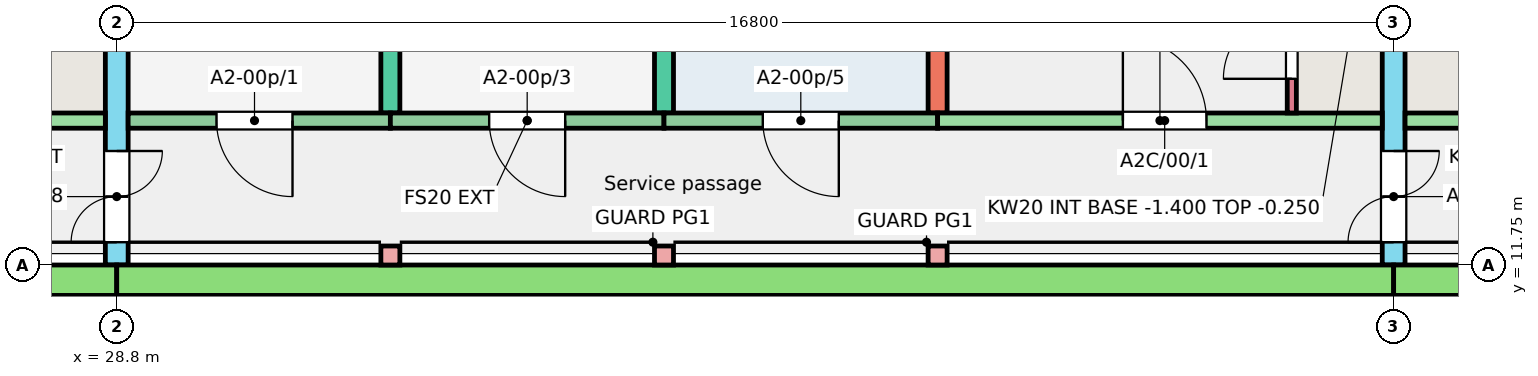
"""IFC4 building model, lengths in metres.
Left out: names, types, materials, properties, quantities, classifications, styles, units other than length and angle.
Written with IfcOpenShell. Run it as: python <this file> out.ifc"""

import sys

from ifc_helpers import new_model, si_unit, direction, frame, frame_2d, origin, origin_2d, place, context, subcontext, project, spatial, rectangle, extrude, element, fill, save


model = new_model("IFC4")
c1 = context("Model", 3, precision=1e-05, world=origin(), true_north=direction((0.0, 1.0)))
c2 = subcontext(c1, "Body", "Model", "MODEL_VIEW")
j1 = project(units=[si_unit("LENGTHUNIT", "METRE"), si_unit("PLANEANGLEUNIT", "RADIAN")], contexts=[c1])
p1 = place(None, origin())
s1 = spatial("IfcSite", under=j1, at=p1, CompositionType="ELEMENT")
p2 = place(p1, origin())
s2 = spatial("IfcBuilding", under=s1, at=p2, CompositionType="ELEMENT")
p3 = place(p2, origin())
s3 = spatial("IfcBuildingStorey", under=s2, at=p3, CompositionType="ELEMENT", Elevation=0.0)
p4 = place(p3, frame((28.8, 11.75, -0.25), z_axis=(0.0, 0.0, 1.0), x_axis=(0.0, 1.0, 0.0)))
e1 = element("IfcWall", 1, at=p4, inside=s3, PredefinedType="SHEAR", context=c2, shape_type="SweptSolid", body=[
    extrude(rectangle(XDim=11.0, YDim=0.3, at=frame_2d((5.5, 0.0))), origin(), (0.0, 0.0, 1.0), 3.25),
])
p5 = place(p4, frame((0.3, 0.0, 0.25)))
e2 = element("IfcOpeningElement", 2, at=p5, cuts=e1, PredefinedType="OPENING", context=c2, shape_type="SweptSolid", body=[
    extrude(rectangle(XDim=1.2, YDim=2.1, at=frame_2d((0.6, 1.05))), frame((0.0, 0.16, 0.0), z_axis=(0.0, -1.0, 0.0), x_axis=(1.0, 0.0, 0.0)), (0.0, 0.0, 1.0), 0.32),
])
for number, where, z_axis, x_axis in (
    (3, (32.4, 13.75, -0.25), (0.0, 0.0, 1.0), (0.0, 1.0, 0.0)),
    (4, (36.0, 13.75, -0.25), (0.0, 0.0, 1.0), (0.0, 1.0, 0.0)),
    (5, (39.6, 13.75, -0.25), (0.0, 0.0, 1.0), (0.0, 1.0, 0.0)),
):
    element("IfcWall", number, at=place(p3, frame(where, z_axis=z_axis, x_axis=x_axis)), inside=s3, PredefinedType="SHEAR", context=c2, shape_type="SweptSolid", body=[
        extrude(rectangle(XDim=9.0, YDim=0.25, at=frame_2d((4.5, 0.0))), origin(), (0.0, 0.0, 1.0), 3.25),
    ])
p6 = place(p3, frame((45.6, 11.75, -0.25), z_axis=(0.0, 0.0, 1.0), x_axis=(0.0, 1.0, 0.0)))
e6 = element("IfcWall", 6, at=p6, inside=s3, PredefinedType="SHEAR", context=c2, shape_type="SweptSolid", body=[
    extrude(rectangle(XDim=11.0, YDim=0.3, at=frame_2d((5.5, 0.0))), origin(), (0.0, 0.0, 1.0), 3.25),
])
p7 = place(p6, frame((0.3, 0.0, 0.25)))
e7 = element("IfcOpeningElement", 7, at=p7, cuts=e6, PredefinedType="OPENING", context=c2, shape_type="SweptSolid", body=[
    extrude(rectangle(XDim=1.2, YDim=2.1, at=frame_2d((0.6, 1.05))), frame((0.0, 0.16, 0.0), z_axis=(0.0, -1.0, 0.0), x_axis=(1.0, 0.0, 0.0)), (0.0, 0.0, 1.0), 0.32),
])
p8 = place(p3, frame((22.8, 13.65, -0.25), z_axis=(0.0, 0.0, 1.0), x_axis=(1.0, 0.0, 0.0)))
e8 = element("IfcWall", 8, at=p8, inside=s3, PredefinedType="SHEAR", context=c2, shape_type="SweptSolid", body=[
    extrude(rectangle(XDim=5.85, YDim=0.2, at=frame_2d((2.925, 0.0))), origin(), (0.0, 0.0, 1.0), 3.25),
])
p9 = place(p8, frame((2.438, 0.0, 0.25)))
e9 = element("IfcOpeningElement", 9, at=p9, cuts=e8, PredefinedType="OPENING", context=c2, shape_type="SweptSolid", body=[
    extrude(rectangle(XDim=1.1, YDim=2.1, at=frame_2d((0.55, 1.05))), frame((0.0, 0.11, 0.0), z_axis=(0.0, -1.0, 0.0), x_axis=(1.0, 0.0, 0.0)), (0.0, 0.0, 1.0), 0.22),
])
p10 = place(p3, frame((28.95, 13.65, -0.25), z_axis=(0.0, 0.0, 1.0), x_axis=(1.0, 0.0, 0.0)))
e10 = element("IfcWall", 10, at=p10, inside=s3, PredefinedType="SOLIDWALL", context=c2, shape_type="SweptSolid", body=[
    extrude(rectangle(XDim=3.45, YDim=0.2, at=frame_2d((1.725, 0.0))), origin(), (0.0, 0.0, 1.0), 3.25),
])
p11 = place(p10, frame((1.163, 0.0, 0.25)))
e11 = element("IfcOpeningElement", 11, at=p11, cuts=e10, PredefinedType="OPENING", context=c2, shape_type="SweptSolid", body=[
    extrude(rectangle(XDim=1.0, YDim=2.1, at=frame_2d((0.5, 1.05))), frame((0.0, 0.11, 0.0), z_axis=(0.0, -1.0, 0.0), x_axis=(1.0, 0.0, 0.0)), (0.0, 0.0, 1.0), 0.22),
])
p12 = place(p3, frame((32.4, 13.65, -0.25), z_axis=(0.0, 0.0, 1.0), x_axis=(1.0, 0.0, 0.0)))
e12 = element("IfcWall", 12, at=p12, inside=s3, PredefinedType="SOLIDWALL", context=c2, shape_type="SweptSolid", body=[
    extrude(rectangle(XDim=3.6, YDim=0.2, at=frame_2d((1.8, 0.0))), origin(), (0.0, 0.0, 1.0), 3.25),
])
p13 = place(p12, frame((1.3, 0.0, 0.25)))
e13 = element("IfcOpeningElement", 13, at=p13, cuts=e12, PredefinedType="OPENING", context=c2, shape_type="SweptSolid", body=[
    extrude(rectangle(XDim=1.0, YDim=2.1, at=frame_2d((0.5, 1.05))), frame((0.0, 0.11, 0.0), z_axis=(0.0, -1.0, 0.0), x_axis=(1.0, 0.0, 0.0)), (0.0, 0.0, 1.0), 0.22),
])
p14 = place(p3, frame((36.0, 13.65, -0.25), z_axis=(0.0, 0.0, 1.0), x_axis=(1.0, 0.0, 0.0)))
e14 = element("IfcWall", 14, at=p14, inside=s3, PredefinedType="SOLIDWALL", context=c2, shape_type="SweptSolid", body=[
    extrude(rectangle(XDim=3.6, YDim=0.2, at=frame_2d((1.8, 0.0))), origin(), (0.0, 0.0, 1.0), 3.25),
])
p15 = place(p14, frame((1.3, 0.0, 0.25)))
e15 = element("IfcOpeningElement", 15, at=p15, cuts=e14, PredefinedType="OPENING", context=c2, shape_type="SweptSolid", body=[
    extrude(rectangle(XDim=1.0, YDim=2.1, at=frame_2d((0.5, 1.05))), frame((0.0, 0.11, 0.0), z_axis=(0.0, -1.0, 0.0), x_axis=(1.0, 0.0, 0.0)), (0.0, 0.0, 1.0), 0.22),
])
p16 = place(p3, frame((39.6, 13.65, -0.25), z_axis=(0.0, 0.0, 1.0), x_axis=(1.0, 0.0, 0.0)))
e16 = element("IfcWall", 16, at=p16, inside=s3, PredefinedType="SHEAR", context=c2, shape_type="SweptSolid", body=[
    extrude(rectangle(XDim=5.85, YDim=0.2, at=frame_2d((2.925, 0.0))), origin(), (0.0, 0.0, 1.0), 3.25),
])
p17 = place(p16, frame((2.438, 0.0, 0.25)))
e17 = element("IfcOpeningElement", 17, at=p17, cuts=e16, PredefinedType="OPENING", context=c2, shape_type="SweptSolid", body=[
    extrude(rectangle(XDim=1.1, YDim=2.1, at=frame_2d((0.55, 1.05))), frame((0.0, 0.11, 0.0), z_axis=(0.0, -1.0, 0.0), x_axis=(1.0, 0.0, 0.0)), (0.0, 0.0, 1.0), 0.22),
])
p18 = place(p3, frame((44.26, 13.75, -0.25), z_axis=(0.0, 0.0, 1.0), x_axis=(0.0, 1.0, 0.0)))
e18 = element("IfcWall", 18, at=p18, inside=s3, PredefinedType="SHEAR", context=c2, shape_type="SweptSolid", body=[
    extrude(rectangle(XDim=1.72, YDim=0.12, at=frame_2d((0.86, 0.0))), origin(), (0.0, 0.0, 1.0), 3.25),
])
p19 = place(p18, frame((0.45, 0.0, 0.25)))
e19 = element("IfcOpeningElement", 19, at=p19, cuts=e18, PredefinedType="OPENING", context=c2, shape_type="SweptSolid", body=[
    extrude(rectangle(XDim=0.9, YDim=2.1, at=frame_2d((0.45, 1.05))), frame((0.0, 0.07, 0.0), z_axis=(0.0, -1.0, 0.0), x_axis=(1.0, 0.0, 0.0)), (0.0, 0.0, 1.0), 0.14),
])
p20 = place(p3, frame((45.75, 13.65, -0.25), z_axis=(0.0, 0.0, 1.0), x_axis=(1.0, 0.0, 0.0)))
e20 = element("IfcWall", 20, at=p20, inside=s3, PredefinedType="SHEAR", context=c2, shape_type="SweptSolid", body=[
    extrude(rectangle(XDim=5.85, YDim=0.2, at=frame_2d((2.925, 0.0))), origin(), (0.0, 0.0, 1.0), 3.25),
])
p21 = place(p20, frame((2.312, 0.0, 0.25)))
e21 = element("IfcOpeningElement", 21, at=p21, cuts=e20, PredefinedType="OPENING", context=c2, shape_type="SweptSolid", body=[
    extrude(rectangle(XDim=1.1, YDim=2.1, at=frame_2d((0.55, 1.05))), frame((0.0, 0.11, 0.0), z_axis=(0.0, -1.0, 0.0), x_axis=(1.0, 0.0, 0.0)), (0.0, 0.0, 1.0), 0.22),
])
for number, where, z_axis, x_axis in (
    (22, (32.4, 11.875, -0.25), (0.0, 0.0, 1.0), (1.0, 0.0, 0.0)),
    (23, (36.0, 11.875, -0.25), (0.0, 0.0, 1.0), (1.0, 0.0, 0.0)),
    (24, (39.6, 11.875, -0.25), (0.0, 0.0, 1.0), (1.0, 0.0, 0.0)),
):
    element("IfcColumn", number, at=place(p3, frame(where, z_axis=z_axis, x_axis=x_axis)), inside=s3, PredefinedType="COLUMN", context=c2, shape_type="SweptSolid", body=[
        extrude(rectangle(XDim=0.25, YDim=0.25, at=origin_2d()), origin(), (0.0, 0.0, 1.0), 3.25),
    ])
for number, where, z_axis, x_axis in (
    (25, (12.0, 11.55, -0.25), (0.0, 0.0, 1.0), (1.0, 0.0, 0.0)),
    (26, (28.8, 11.55, -0.25), (0.0, 0.0, 1.0), (1.0, 0.0, 0.0)),
):
    element("IfcWall", number, at=place(p3, frame(where, z_axis=z_axis, x_axis=x_axis)), inside=s3, PredefinedType="SOLIDWALL", context=c2, shape_type="SweptSolid", body=[
        extrude(rectangle(XDim=16.8, YDim=0.4, at=frame_2d((8.4, 0.0))), origin(), (0.0, 0.0, 1.0), 3.25),
    ])
p22 = place(p3, frame((45.6, 11.55, -0.25), z_axis=(0.0, 0.0, 1.0), x_axis=(1.0, 0.0, 0.0)))
e27 = element("IfcWall", 27, at=p22, inside=s3, PredefinedType="SOLIDWALL", context=c2, shape_type="SweptSolid", body=[
    extrude(rectangle(XDim=16.8, YDim=0.4, at=frame_2d((8.4, 0.0))), origin(), (0.0, 0.0, 1.0), 3.25),
])
p23 = place(p11, origin())
e28 = element("IfcDoor", 28, at=p23, inside=s3, OperationType="SINGLE_SWING_RIGHT", PredefinedType="DOOR", context=c2, shape_type="SweptSolid", body=[
    extrude(rectangle(XDim=1.0, YDim=2.1, at=frame_2d((0.5, 1.05))), frame((0.0, 0.025, 0.0), z_axis=(0.0, -1.0, 0.0), x_axis=(1.0, 0.0, 0.0)), (0.0, 0.0, 1.0), 0.05),
])
fill(e11, e28)
p24 = place(p13, origin())
e29 = element("IfcDoor", 29, at=p24, inside=s3, OperationType="SINGLE_SWING_RIGHT", PredefinedType="DOOR", context=c2, shape_type="SweptSolid", body=[
    extrude(rectangle(XDim=1.0, YDim=2.1, at=frame_2d((0.5, 1.05))), frame((0.0, 0.025, 0.0), z_axis=(0.0, -1.0, 0.0), x_axis=(1.0, 0.0, 0.0)), (0.0, 0.0, 1.0), 0.05),
])
fill(e13, e29)
p25 = place(p15, origin())
e30 = element("IfcDoor", 30, at=p25, inside=s3, OperationType="SINGLE_SWING_RIGHT", PredefinedType="DOOR", context=c2, shape_type="SweptSolid", body=[
    extrude(rectangle(XDim=1.0, YDim=2.1, at=frame_2d((0.5, 1.05))), frame((0.0, 0.025, 0.0), z_axis=(0.0, -1.0, 0.0), x_axis=(1.0, 0.0, 0.0)), (0.0, 0.0, 1.0), 0.05),
])
fill(e15, e30)
p26 = place(p17, origin())
e31 = element("IfcDoor", 31, at=p26, inside=s3, OperationType="SINGLE_SWING_LEFT", PredefinedType="DOOR", context=c2, shape_type="SweptSolid", body=[
    extrude(rectangle(XDim=1.1, YDim=2.1, at=frame_2d((0.55, 1.05))), frame((0.0, 0.025, 0.0), z_axis=(0.0, -1.0, 0.0), x_axis=(1.0, 0.0, 0.0)), (0.0, 0.0, 1.0), 0.05),
])
fill(e17, e31)
p27 = place(p19, origin())
e32 = element("IfcDoor", 32, at=p27, inside=s3, OperationType="SINGLE_SWING_LEFT", PredefinedType="DOOR", context=c2, shape_type="SweptSolid", body=[
    extrude(rectangle(XDim=0.9, YDim=2.1, at=frame_2d((0.45, 1.05))), frame((0.0, 0.025, 0.0), z_axis=(0.0, -1.0, 0.0), x_axis=(1.0, 0.0, 0.0)), (0.0, 0.0, 1.0), 0.05),
])
fill(e19, e32)
p28 = place(p5, origin())
e33 = element("IfcDoor", 33, at=p28, inside=s3, OperationType="DOUBLE_DOOR_SINGLE_SWING", PredefinedType="DOOR", context=c2, shape_type="SweptSolid", body=[
    extrude(rectangle(XDim=1.2, YDim=2.1, at=frame_2d((0.6, 1.05))), frame((0.0, 0.025, 0.0), z_axis=(0.0, -1.0, 0.0), x_axis=(1.0, 0.0, 0.0)), (0.0, 0.0, 1.0), 0.05),
])
fill(e2, e33)
p29 = place(p7, origin())
e34 = element("IfcDoor", 34, at=p29, inside=s3, OperationType="DOUBLE_DOOR_SINGLE_SWING", PredefinedType="DOOR", context=c2, shape_type="SweptSolid", body=[
    extrude(rectangle(XDim=1.2, YDim=2.1, at=frame_2d((0.6, 1.05))), frame((0.0, 0.025, 0.0), z_axis=(0.0, -1.0, 0.0), x_axis=(1.0, 0.0, 0.0)), (0.0, 0.0, 1.0), 0.05),
])
fill(e7, e34)
save(model, sys.argv[1])
